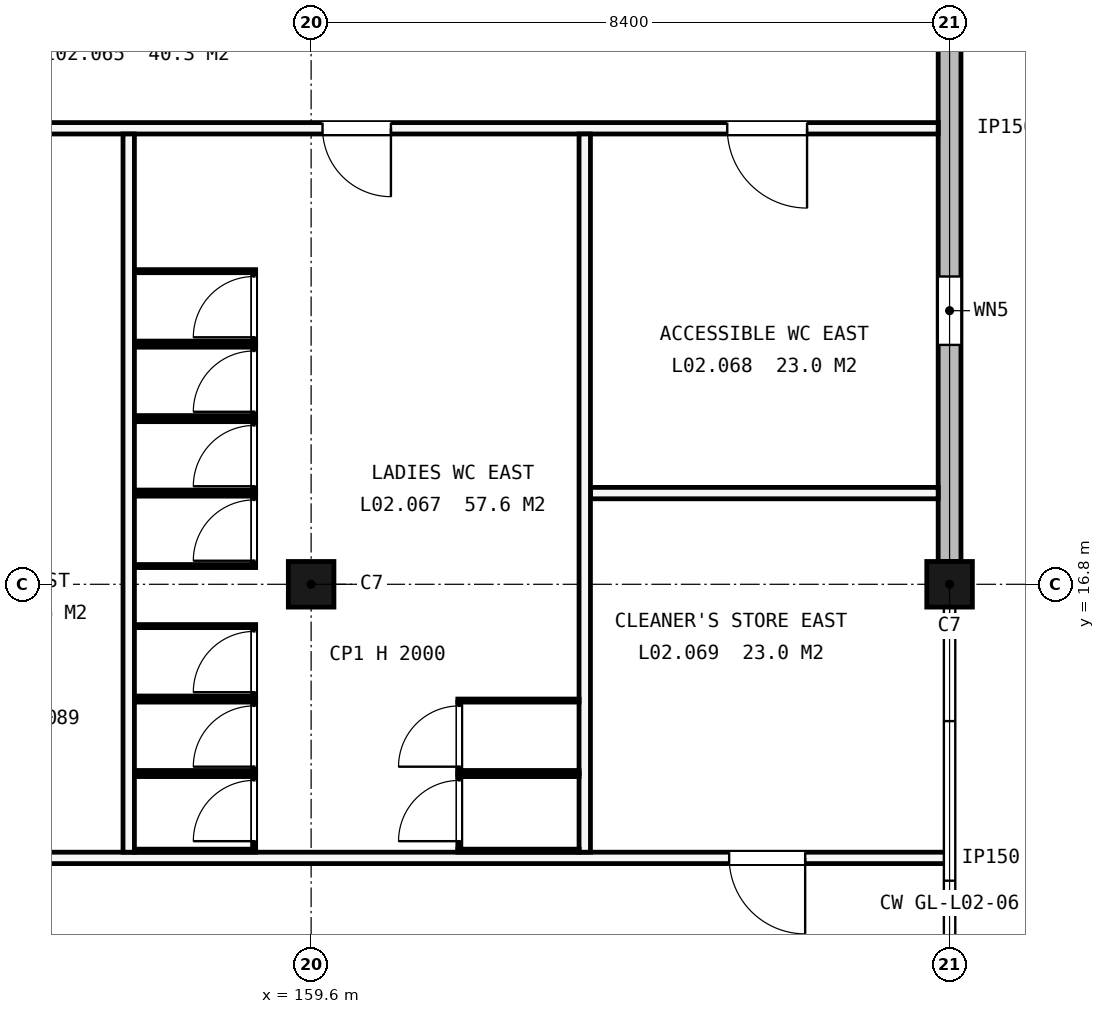
"""IFC4 building model, lengths in metres.
Left out: names, types, materials, properties, quantities, classifications, styles, units other than length and angle.
Written with IfcOpenShell. Run it as: python <this file> out.ifc"""

import sys

from ifc_helpers import new_model, si_unit, direction, frame, frame_2d, origin, origin_2d, place, context, subcontext, project, spatial, rectangle, extrude, element, fill, save


model = new_model("IFC4")
c1 = context("Model", 3, precision=1e-05, world=origin(), true_north=direction((0.0, 1.0)))
c2 = subcontext(c1, "Body", "Model", "MODEL_VIEW")
j1 = project(units=[si_unit("LENGTHUNIT", "METRE"), si_unit("PLANEANGLEUNIT", "RADIAN")], contexts=[c1])
p1 = place(None, origin())
s1 = spatial("IfcSite", under=j1, at=p1, CompositionType="ELEMENT")
p2 = place(p1, origin())
s2 = spatial("IfcBuilding", under=s1, at=p2, CompositionType="ELEMENT")
p3 = place(p2, frame((0.0, 0.0, 9.9)))
s3 = spatial("IfcBuildingStorey", under=s2, at=p3, CompositionType="ELEMENT", Elevation=9.9)
for number, where, z_axis, x_axis in (
    (1, (159.6, 16.8, -0.25), (0.0, 0.0, 1.0), (1.0, 0.0, 0.0)),
    (2, (168.0, 16.8, -0.25), (0.0, 0.0, 1.0), (1.0, 0.0, 0.0)),
):
    element("IfcColumn", number, at=place(p3, frame(where, z_axis=z_axis, x_axis=x_axis)), inside=s3, PredefinedType="COLUMN", context=c2, shape_type="SweptSolid", body=[
        extrude(rectangle(XDim=0.6, YDim=0.6, at=origin_2d()), origin(), (0.0, 0.0, 1.0), 4.45),
    ])
p4 = place(p3, frame((168.0, 17.1, 0.0), z_axis=(0.0, 0.0, 1.0), x_axis=(0.0, 1.0, 0.0)))
e3 = element("IfcWall", 3, at=p4, inside=s3, PredefinedType="STANDARD", context=c2, shape_type="SweptSolid", body=[
    extrude(rectangle(XDim=7.8, YDim=0.3, at=frame_2d((3.9, 0.0))), origin(), (0.0, 0.0, 1.0), 3.4),
])
p5 = place(p4, frame((2.85, 0.0, 2.1)))
e4 = element("IfcOpeningElement", 4, at=p5, cuts=e3, PredefinedType="OPENING", context=c2, shape_type="SweptSolid", body=[
    extrude(rectangle(XDim=0.9, YDim=0.6, at=frame_2d((0.45, 0.3))), frame((0.0, 0.16, 0.0), z_axis=(0.0, -1.0, 0.0), x_axis=(1.0, 0.0, 0.0)), (0.0, 0.0, 1.0), 0.32),
])
p6 = place(p3, frame((151.275, 13.2, 0.0), z_axis=(0.0, 0.0, 1.0), x_axis=(1.0, 0.0, 0.0)))
e5 = element("IfcWall", 5, at=p6, inside=s3, PredefinedType="PARTITIONING", context=c2, shape_type="SweptSolid", body=[
    extrude(rectangle(XDim=16.725, YDim=0.15, at=frame_2d((8.363, 0.0))), origin(), (0.0, 0.0, 1.0), 4.2),
])
p7 = place(p6, frame((13.825, 0.0, 0.0)))
e6 = element("IfcOpeningElement", 6, at=p7, cuts=e5, PredefinedType="OPENING", context=c2, shape_type="SweptSolid", body=[
    extrude(rectangle(XDim=1.0, YDim=2.1, at=frame_2d((0.5, 1.05))), frame((0.0, 0.085, 0.0), z_axis=(0.0, -1.0, 0.0), x_axis=(1.0, 0.0, 0.0)), (0.0, 0.0, 1.0), 0.17),
])
p8 = place(p3, frame((163.275, 18.0, 0.0), z_axis=(0.0, 0.0, 1.0), x_axis=(1.0, 0.0, 0.0)))
e7 = element("IfcWall", 7, at=p8, inside=s3, PredefinedType="PARTITIONING", context=c2, shape_type="SweptSolid", body=[
    extrude(rectangle(XDim=4.575, YDim=0.15, at=frame_2d((2.288, 0.0))), origin(), (0.0, 0.0, 1.0), 4.2),
])
p9 = place(p3, frame((151.275, 22.8, 0.0), z_axis=(0.0, 0.0, 1.0), x_axis=(1.0, 0.0, 0.0)))
e8 = element("IfcWall", 8, at=p9, inside=s3, PredefinedType="PARTITIONING", context=c2, shape_type="SweptSolid", body=[
    extrude(rectangle(XDim=16.575, YDim=0.15, at=frame_2d((8.288, 0.0))), origin(), (0.0, 0.0, 1.0), 4.2),
])
p10 = place(p9, frame((2.475, 0.0, 0.0)))
e9 = element("IfcOpeningElement", 9, at=p10, cuts=e8, PredefinedType="OPENING", context=c2, shape_type="SweptSolid", body=[
    extrude(rectangle(XDim=0.9, YDim=2.1, at=frame_2d((0.45, 1.05))), frame((0.0, 0.085, 0.0), z_axis=(0.0, -1.0, 0.0), x_axis=(1.0, 0.0, 0.0)), (0.0, 0.0, 1.0), 0.17),
])
p11 = place(p9, frame((8.475, 0.0, 0.0)))
e10 = element("IfcOpeningElement", 10, at=p11, cuts=e8, PredefinedType="OPENING", context=c2, shape_type="SweptSolid", body=[
    extrude(rectangle(XDim=0.9, YDim=2.1, at=frame_2d((0.45, 1.05))), frame((0.0, 0.085, 0.0), z_axis=(0.0, -1.0, 0.0), x_axis=(1.0, 0.0, 0.0)), (0.0, 0.0, 1.0), 0.17),
])
p12 = place(p9, frame((13.8, 0.0, 0.0)))
e11 = element("IfcOpeningElement", 11, at=p12, cuts=e8, PredefinedType="OPENING", context=c2, shape_type="SweptSolid", body=[
    extrude(rectangle(XDim=1.05, YDim=2.25, at=frame_2d((0.525, 1.125))), frame((0.0, 0.085, 0.0), z_axis=(0.0, -1.0, 0.0), x_axis=(1.0, 0.0, 0.0)), (0.0, 0.0, 1.0), 0.17),
])
for number, where, z_axis, x_axis in (
    (12, (157.2, 13.275, 0.0), (0.0, 0.0, 1.0), (0.0, 1.0, 0.0)),
    (13, (163.2, 13.275, 0.0), (0.0, 0.0, 1.0), (0.0, 1.0, 0.0)),
):
    element("IfcWall", number, at=place(p3, frame(where, z_axis=z_axis, x_axis=x_axis)), inside=s3, PredefinedType="PARTITIONING", context=c2, shape_type="SweptSolid", body=[
        extrude(rectangle(XDim=9.45, YDim=0.15, at=frame_2d((4.725, 0.0))), origin(), (0.0, 0.0, 1.0), 4.2),
    ])
for number, where, z_axis, x_axis in (
    (14, (157.275, 13.295, 0.0), (0.0, 0.0, 1.0), (1.0, 0.0, 0.0)),
    (15, (157.275, 14.29, 0.0), (0.0, 0.0, 1.0), (1.0, 0.0, 0.0)),
):
    element("IfcWall", number, at=place(p3, frame(where, z_axis=z_axis, x_axis=x_axis)), inside=s3, PredefinedType="PARTITIONING", context=c2, shape_type="SweptSolid", body=[
        extrude(rectangle(XDim=1.595, YDim=0.04, at=frame_2d((0.798, 0.0))), origin(), (0.0, 0.0, 1.0), 2.0),
    ])
p13 = place(p3, frame((158.85, 13.315, 0.0), z_axis=(0.0, 0.0, 1.0), x_axis=(0.0, 1.0, 0.0)))
e16 = element("IfcWall", 16, at=p13, inside=s3, PredefinedType="PARTITIONING", context=c2, shape_type="SweptSolid", body=[
    extrude(rectangle(XDim=0.955, YDim=0.04, at=frame_2d((0.478, 0.0))), origin(), (0.0, 0.0, 1.0), 2.0),
])
p14 = place(p13, frame((0.105, 0.0, 0.0)))
e17 = element("IfcOpeningElement", 17, at=p14, cuts=e16, PredefinedType="OPENING", context=c2, shape_type="SweptSolid", body=[
    extrude(rectangle(XDim=0.8, YDim=2.0, at=frame_2d((0.4, 1.0))), frame((0.0, 0.03, 0.0), z_axis=(0.0, -1.0, 0.0), x_axis=(1.0, 0.0, 0.0)), (0.0, 0.0, 1.0), 0.06),
])
for number, where, z_axis, x_axis in (
    (18, (157.275, 14.33, 0.0), (0.0, 0.0, 1.0), (1.0, 0.0, 0.0)),
    (19, (157.275, 15.27, 0.0), (0.0, 0.0, 1.0), (1.0, 0.0, 0.0)),
):
    element("IfcWall", number, at=place(p3, frame(where, z_axis=z_axis, x_axis=x_axis)), inside=s3, PredefinedType="PARTITIONING", context=c2, shape_type="SweptSolid", body=[
        extrude(rectangle(XDim=1.595, YDim=0.04, at=frame_2d((0.798, 0.0))), origin(), (0.0, 0.0, 1.0), 2.0),
    ])
p15 = place(p3, frame((158.85, 14.35, 0.0), z_axis=(0.0, 0.0, 1.0), x_axis=(0.0, 1.0, 0.0)))
e20 = element("IfcWall", 20, at=p15, inside=s3, PredefinedType="PARTITIONING", context=c2, shape_type="SweptSolid", body=[
    extrude(rectangle(XDim=0.9, YDim=0.04, at=frame_2d((0.45, 0.0))), origin(), (0.0, 0.0, 1.0), 2.0),
])
p16 = place(p15, frame((0.05, 0.0, 0.0)))
e21 = element("IfcOpeningElement", 21, at=p16, cuts=e20, PredefinedType="OPENING", context=c2, shape_type="SweptSolid", body=[
    extrude(rectangle(XDim=0.8, YDim=2.0, at=frame_2d((0.4, 1.0))), frame((0.0, 0.03, 0.0), z_axis=(0.0, -1.0, 0.0), x_axis=(1.0, 0.0, 0.0)), (0.0, 0.0, 1.0), 0.06),
])
for number, where, z_axis, x_axis in (
    (22, (157.275, 15.31, 0.0), (0.0, 0.0, 1.0), (1.0, 0.0, 0.0)),
    (23, (157.275, 16.25, 0.0), (0.0, 0.0, 1.0), (1.0, 0.0, 0.0)),
):
    element("IfcWall", number, at=place(p3, frame(where, z_axis=z_axis, x_axis=x_axis)), inside=s3, PredefinedType="PARTITIONING", context=c2, shape_type="SweptSolid", body=[
        extrude(rectangle(XDim=1.595, YDim=0.04, at=frame_2d((0.798, 0.0))), origin(), (0.0, 0.0, 1.0), 2.0),
    ])
p17 = place(p3, frame((158.85, 15.33, 0.0), z_axis=(0.0, 0.0, 1.0), x_axis=(0.0, 1.0, 0.0)))
e24 = element("IfcWall", 24, at=p17, inside=s3, PredefinedType="PARTITIONING", context=c2, shape_type="SweptSolid", body=[
    extrude(rectangle(XDim=0.9, YDim=0.04, at=frame_2d((0.45, 0.0))), origin(), (0.0, 0.0, 1.0), 2.0),
])
p18 = place(p17, frame((0.05, 0.0, 0.0)))
e25 = element("IfcOpeningElement", 25, at=p18, cuts=e24, PredefinedType="OPENING", context=c2, shape_type="SweptSolid", body=[
    extrude(rectangle(XDim=0.8, YDim=2.0, at=frame_2d((0.4, 1.0))), frame((0.0, 0.03, 0.0), z_axis=(0.0, -1.0, 0.0), x_axis=(1.0, 0.0, 0.0)), (0.0, 0.0, 1.0), 0.06),
])
for number, where, z_axis, x_axis in (
    (26, (157.275, 17.04, 0.0), (0.0, 0.0, 1.0), (1.0, 0.0, 0.0)),
    (27, (157.275, 17.98, 0.0), (0.0, 0.0, 1.0), (1.0, 0.0, 0.0)),
):
    element("IfcWall", number, at=place(p3, frame(where, z_axis=z_axis, x_axis=x_axis)), inside=s3, PredefinedType="PARTITIONING", context=c2, shape_type="SweptSolid", body=[
        extrude(rectangle(XDim=1.595, YDim=0.04, at=frame_2d((0.798, 0.0))), origin(), (0.0, 0.0, 1.0), 2.0),
    ])
p19 = place(p3, frame((158.85, 17.06, 0.0), z_axis=(0.0, 0.0, 1.0), x_axis=(0.0, 1.0, 0.0)))
e28 = element("IfcWall", 28, at=p19, inside=s3, PredefinedType="PARTITIONING", context=c2, shape_type="SweptSolid", body=[
    extrude(rectangle(XDim=0.9, YDim=0.04, at=frame_2d((0.45, 0.0))), origin(), (0.0, 0.0, 1.0), 2.0),
])
p20 = place(p19, frame((0.05, 0.0, 0.0)))
e29 = element("IfcOpeningElement", 29, at=p20, cuts=e28, PredefinedType="OPENING", context=c2, shape_type="SweptSolid", body=[
    extrude(rectangle(XDim=0.8, YDim=2.0, at=frame_2d((0.4, 1.0))), frame((0.0, 0.03, 0.0), z_axis=(0.0, -1.0, 0.0), x_axis=(1.0, 0.0, 0.0)), (0.0, 0.0, 1.0), 0.06),
])
for number, where, z_axis, x_axis in (
    (30, (157.275, 18.02, 0.0), (0.0, 0.0, 1.0), (1.0, 0.0, 0.0)),
    (31, (157.275, 18.96, 0.0), (0.0, 0.0, 1.0), (1.0, 0.0, 0.0)),
):
    element("IfcWall", number, at=place(p3, frame(where, z_axis=z_axis, x_axis=x_axis)), inside=s3, PredefinedType="PARTITIONING", context=c2, shape_type="SweptSolid", body=[
        extrude(rectangle(XDim=1.595, YDim=0.04, at=frame_2d((0.798, 0.0))), origin(), (0.0, 0.0, 1.0), 2.0),
    ])
p21 = place(p3, frame((158.85, 18.04, 0.0), z_axis=(0.0, 0.0, 1.0), x_axis=(0.0, 1.0, 0.0)))
e32 = element("IfcWall", 32, at=p21, inside=s3, PredefinedType="PARTITIONING", context=c2, shape_type="SweptSolid", body=[
    extrude(rectangle(XDim=0.9, YDim=0.04, at=frame_2d((0.45, 0.0))), origin(), (0.0, 0.0, 1.0), 2.0),
])
p22 = place(p21, frame((0.05, 0.0, 0.0)))
e33 = element("IfcOpeningElement", 33, at=p22, cuts=e32, PredefinedType="OPENING", context=c2, shape_type="SweptSolid", body=[
    extrude(rectangle(XDim=0.8, YDim=2.0, at=frame_2d((0.4, 1.0))), frame((0.0, 0.03, 0.0), z_axis=(0.0, -1.0, 0.0), x_axis=(1.0, 0.0, 0.0)), (0.0, 0.0, 1.0), 0.06),
])
for number, where, z_axis, x_axis in (
    (34, (157.275, 19.0, 0.0), (0.0, 0.0, 1.0), (1.0, 0.0, 0.0)),
    (35, (157.275, 19.94, 0.0), (0.0, 0.0, 1.0), (1.0, 0.0, 0.0)),
):
    element("IfcWall", number, at=place(p3, frame(where, z_axis=z_axis, x_axis=x_axis)), inside=s3, PredefinedType="PARTITIONING", context=c2, shape_type="SweptSolid", body=[
        extrude(rectangle(XDim=1.595, YDim=0.04, at=frame_2d((0.798, 0.0))), origin(), (0.0, 0.0, 1.0), 2.0),
    ])
p23 = place(p3, frame((158.85, 19.02, 0.0), z_axis=(0.0, 0.0, 1.0), x_axis=(0.0, 1.0, 0.0)))
e36 = element("IfcWall", 36, at=p23, inside=s3, PredefinedType="PARTITIONING", context=c2, shape_type="SweptSolid", body=[
    extrude(rectangle(XDim=0.9, YDim=0.04, at=frame_2d((0.45, 0.0))), origin(), (0.0, 0.0, 1.0), 2.0),
])
p24 = place(p23, frame((0.05, 0.0, 0.0)))
e37 = element("IfcOpeningElement", 37, at=p24, cuts=e36, PredefinedType="OPENING", context=c2, shape_type="SweptSolid", body=[
    extrude(rectangle(XDim=0.8, YDim=2.0, at=frame_2d((0.4, 1.0))), frame((0.0, 0.03, 0.0), z_axis=(0.0, -1.0, 0.0), x_axis=(1.0, 0.0, 0.0)), (0.0, 0.0, 1.0), 0.06),
])
for number, where, z_axis, x_axis in (
    (38, (157.275, 19.98, 0.0), (0.0, 0.0, 1.0), (1.0, 0.0, 0.0)),
    (39, (157.275, 20.92, 0.0), (0.0, 0.0, 1.0), (1.0, 0.0, 0.0)),
):
    element("IfcWall", number, at=place(p3, frame(where, z_axis=z_axis, x_axis=x_axis)), inside=s3, PredefinedType="PARTITIONING", context=c2, shape_type="SweptSolid", body=[
        extrude(rectangle(XDim=1.595, YDim=0.04, at=frame_2d((0.798, 0.0))), origin(), (0.0, 0.0, 1.0), 2.0),
    ])
p25 = place(p3, frame((158.85, 20.0, 0.0), z_axis=(0.0, 0.0, 1.0), x_axis=(0.0, 1.0, 0.0)))
e40 = element("IfcWall", 40, at=p25, inside=s3, PredefinedType="PARTITIONING", context=c2, shape_type="SweptSolid", body=[
    extrude(rectangle(XDim=0.9, YDim=0.04, at=frame_2d((0.45, 0.0))), origin(), (0.0, 0.0, 1.0), 2.0),
])
p26 = place(p25, frame((0.05, 0.0, 0.0)))
e41 = element("IfcOpeningElement", 41, at=p26, cuts=e40, PredefinedType="OPENING", context=c2, shape_type="SweptSolid", body=[
    extrude(rectangle(XDim=0.8, YDim=2.0, at=frame_2d((0.4, 1.0))), frame((0.0, 0.03, 0.0), z_axis=(0.0, -1.0, 0.0), x_axis=(1.0, 0.0, 0.0)), (0.0, 0.0, 1.0), 0.06),
])
for number, where, z_axis, x_axis in (
    (42, (163.125, 13.295, 0.0), (0.0, 0.0, 1.0), (-1.0, 0.0, 0.0)),
    (43, (163.125, 14.29, 0.0), (0.0, 0.0, 1.0), (-1.0, 0.0, 0.0)),
):
    element("IfcWall", number, at=place(p3, frame(where, z_axis=z_axis, x_axis=x_axis)), inside=s3, PredefinedType="PARTITIONING", context=c2, shape_type="SweptSolid", body=[
        extrude(rectangle(XDim=1.595, YDim=0.04, at=frame_2d((0.797, 0.0))), origin(), (0.0, 0.0, 1.0), 2.0),
    ])
p27 = place(p3, frame((161.55, 13.315, 0.0), z_axis=(0.0, 0.0, 1.0), x_axis=(0.0, 1.0, 0.0)))
e44 = element("IfcWall", 44, at=p27, inside=s3, PredefinedType="PARTITIONING", context=c2, shape_type="SweptSolid", body=[
    extrude(rectangle(XDim=0.955, YDim=0.04, at=frame_2d((0.478, 0.0))), origin(), (0.0, 0.0, 1.0), 2.0),
])
p28 = place(p27, frame((0.105, 0.0, 0.0)))
e45 = element("IfcOpeningElement", 45, at=p28, cuts=e44, PredefinedType="OPENING", context=c2, shape_type="SweptSolid", body=[
    extrude(rectangle(XDim=0.8, YDim=2.0, at=frame_2d((0.4, 1.0))), frame((0.0, 0.03, 0.0), z_axis=(0.0, -1.0, 0.0), x_axis=(1.0, 0.0, 0.0)), (0.0, 0.0, 1.0), 0.06),
])
for number, where, z_axis, x_axis in (
    (46, (163.125, 14.33, 0.0), (0.0, 0.0, 1.0), (-1.0, 0.0, 0.0)),
    (47, (163.125, 15.27, 0.0), (0.0, 0.0, 1.0), (-1.0, 0.0, 0.0)),
):
    element("IfcWall", number, at=place(p3, frame(where, z_axis=z_axis, x_axis=x_axis)), inside=s3, PredefinedType="PARTITIONING", context=c2, shape_type="SweptSolid", body=[
        extrude(rectangle(XDim=1.595, YDim=0.04, at=frame_2d((0.797, 0.0))), origin(), (0.0, 0.0, 1.0), 2.0),
    ])
p29 = place(p3, frame((161.55, 14.35, 0.0), z_axis=(0.0, 0.0, 1.0), x_axis=(0.0, 1.0, 0.0)))
e48 = element("IfcWall", 48, at=p29, inside=s3, PredefinedType="PARTITIONING", context=c2, shape_type="SweptSolid", body=[
    extrude(rectangle(XDim=0.9, YDim=0.04, at=frame_2d((0.45, 0.0))), origin(), (0.0, 0.0, 1.0), 2.0),
])
p30 = place(p29, frame((0.05, 0.0, 0.0)))
e49 = element("IfcOpeningElement", 49, at=p30, cuts=e48, PredefinedType="OPENING", context=c2, shape_type="SweptSolid", body=[
    extrude(rectangle(XDim=0.8, YDim=2.0, at=frame_2d((0.4, 1.0))), frame((0.0, 0.03, 0.0), z_axis=(0.0, -1.0, 0.0), x_axis=(1.0, 0.0, 0.0)), (0.0, 0.0, 1.0), 0.06),
])
p31 = place(p5, origin())
e50 = element("IfcWindow", 50, at=p31, inside=s3, PartitioningType="SINGLE_PANEL", PredefinedType="WINDOW", context=c2, shape_type="SweptSolid", body=[
    extrude(rectangle(XDim=0.9, YDim=0.6, at=frame_2d((0.45, 0.3))), frame((0.0, 0.03, 0.0), z_axis=(0.0, -1.0, 0.0), x_axis=(1.0, 0.0, 0.0)), (0.0, 0.0, 1.0), 0.06),
])
fill(e4, e50)
p32 = place(p11, origin())
e51 = element("IfcDoor", 51, at=p32, inside=s3, OperationType="SINGLE_SWING_RIGHT", PredefinedType="DOOR", context=c2, shape_type="SweptSolid", body=[
    extrude(rectangle(XDim=0.9, YDim=2.1, at=frame_2d((0.45, 1.05))), frame((0.0, 0.025, 0.0), z_axis=(0.0, -1.0, 0.0), x_axis=(1.0, 0.0, 0.0)), (0.0, 0.0, 1.0), 0.05),
])
fill(e10, e51)
p33 = place(p12, origin())
e52 = element("IfcDoor", 52, at=p33, inside=s3, OperationType="SINGLE_SWING_RIGHT", PredefinedType="DOOR", context=c2, shape_type="SweptSolid", body=[
    extrude(rectangle(XDim=1.05, YDim=2.25, at=frame_2d((0.525, 1.125))), frame((0.0, 0.025, 0.0), z_axis=(0.0, -1.0, 0.0), x_axis=(1.0, 0.0, 0.0)), (0.0, 0.0, 1.0), 0.05),
])
fill(e11, e52)
p34 = place(p7, origin())
e53 = element("IfcDoor", 53, at=p34, inside=s3, OperationType="SINGLE_SWING_RIGHT", PredefinedType="DOOR", context=c2, shape_type="SweptSolid", body=[
    extrude(rectangle(XDim=1.0, YDim=2.1, at=frame_2d((0.5, 1.05))), frame((0.0, 0.025, 0.0), z_axis=(0.0, -1.0, 0.0), x_axis=(1.0, 0.0, 0.0)), (0.0, 0.0, 1.0), 0.05),
])
fill(e6, e53)
p35 = place(p14, origin())
e54 = element("IfcDoor", 54, at=p35, inside=s3, OperationType="SINGLE_SWING_LEFT", PredefinedType="DOOR", context=c2, shape_type="SweptSolid", body=[
    extrude(rectangle(XDim=0.8, YDim=2.0, at=frame_2d((0.4, 1.0))), frame((0.0, 0.02, 0.0), z_axis=(0.0, -1.0, 0.0), x_axis=(1.0, 0.0, 0.0)), (0.0, 0.0, 1.0), 0.04),
])
fill(e17, e54)
p36 = place(p16, origin())
e55 = element("IfcDoor", 55, at=p36, inside=s3, OperationType="SINGLE_SWING_LEFT", PredefinedType="DOOR", context=c2, shape_type="SweptSolid", body=[
    extrude(rectangle(XDim=0.8, YDim=2.0, at=frame_2d((0.4, 1.0))), frame((0.0, 0.02, 0.0), z_axis=(0.0, -1.0, 0.0), x_axis=(1.0, 0.0, 0.0)), (0.0, 0.0, 1.0), 0.04),
])
fill(e21, e55)
p37 = place(p18, origin())
e56 = element("IfcDoor", 56, at=p37, inside=s3, OperationType="SINGLE_SWING_LEFT", PredefinedType="DOOR", context=c2, shape_type="SweptSolid", body=[
    extrude(rectangle(XDim=0.8, YDim=2.0, at=frame_2d((0.4, 1.0))), frame((0.0, 0.02, 0.0), z_axis=(0.0, -1.0, 0.0), x_axis=(1.0, 0.0, 0.0)), (0.0, 0.0, 1.0), 0.04),
])
fill(e25, e56)
p38 = place(p20, origin())
e57 = element("IfcDoor", 57, at=p38, inside=s3, OperationType="SINGLE_SWING_LEFT", PredefinedType="DOOR", context=c2, shape_type="SweptSolid", body=[
    extrude(rectangle(XDim=0.8, YDim=2.0, at=frame_2d((0.4, 1.0))), frame((0.0, 0.02, 0.0), z_axis=(0.0, -1.0, 0.0), x_axis=(1.0, 0.0, 0.0)), (0.0, 0.0, 1.0), 0.04),
])
fill(e29, e57)
p39 = place(p22, origin())
e58 = element("IfcDoor", 58, at=p39, inside=s3, OperationType="SINGLE_SWING_LEFT", PredefinedType="DOOR", context=c2, shape_type="SweptSolid", body=[
    extrude(rectangle(XDim=0.8, YDim=2.0, at=frame_2d((0.4, 1.0))), frame((0.0, 0.02, 0.0), z_axis=(0.0, -1.0, 0.0), x_axis=(1.0, 0.0, 0.0)), (0.0, 0.0, 1.0), 0.04),
])
fill(e33, e58)
p40 = place(p24, origin())
e59 = element("IfcDoor", 59, at=p40, inside=s3, OperationType="SINGLE_SWING_LEFT", PredefinedType="DOOR", context=c2, shape_type="SweptSolid", body=[
    extrude(rectangle(XDim=0.8, YDim=2.0, at=frame_2d((0.4, 1.0))), frame((0.0, 0.02, 0.0), z_axis=(0.0, -1.0, 0.0), x_axis=(1.0, 0.0, 0.0)), (0.0, 0.0, 1.0), 0.04),
])
fill(e37, e59)
p41 = place(p26, origin())
e60 = element("IfcDoor", 60, at=p41, inside=s3, OperationType="SINGLE_SWING_LEFT", PredefinedType="DOOR", context=c2, shape_type="SweptSolid", body=[
    extrude(rectangle(XDim=0.8, YDim=2.0, at=frame_2d((0.4, 1.0))), frame((0.0, 0.02, 0.0), z_axis=(0.0, -1.0, 0.0), x_axis=(1.0, 0.0, 0.0)), (0.0, 0.0, 1.0), 0.04),
])
fill(e41, e60)
p42 = place(p28, origin())
e61 = element("IfcDoor", 61, at=p42, inside=s3, OperationType="SINGLE_SWING_LEFT", PredefinedType="DOOR", context=c2, shape_type="SweptSolid", body=[
    extrude(rectangle(XDim=0.8, YDim=2.0, at=frame_2d((0.4, 1.0))), frame((0.0, 0.02, 0.0), z_axis=(0.0, -1.0, 0.0), x_axis=(1.0, 0.0, 0.0)), (0.0, 0.0, 1.0), 0.04),
])
fill(e45, e61)
p43 = place(p30, origin())
e62 = element("IfcDoor", 62, at=p43, inside=s3, OperationType="SINGLE_SWING_LEFT", PredefinedType="DOOR", context=c2, shape_type="SweptSolid", body=[
    extrude(rectangle(XDim=0.8, YDim=2.0, at=frame_2d((0.4, 1.0))), frame((0.0, 0.02, 0.0), z_axis=(0.0, -1.0, 0.0), x_axis=(1.0, 0.0, 0.0)), (0.0, 0.0, 1.0), 0.04),
])
fill(e49, e62)
save(model, sys.argv[1])
